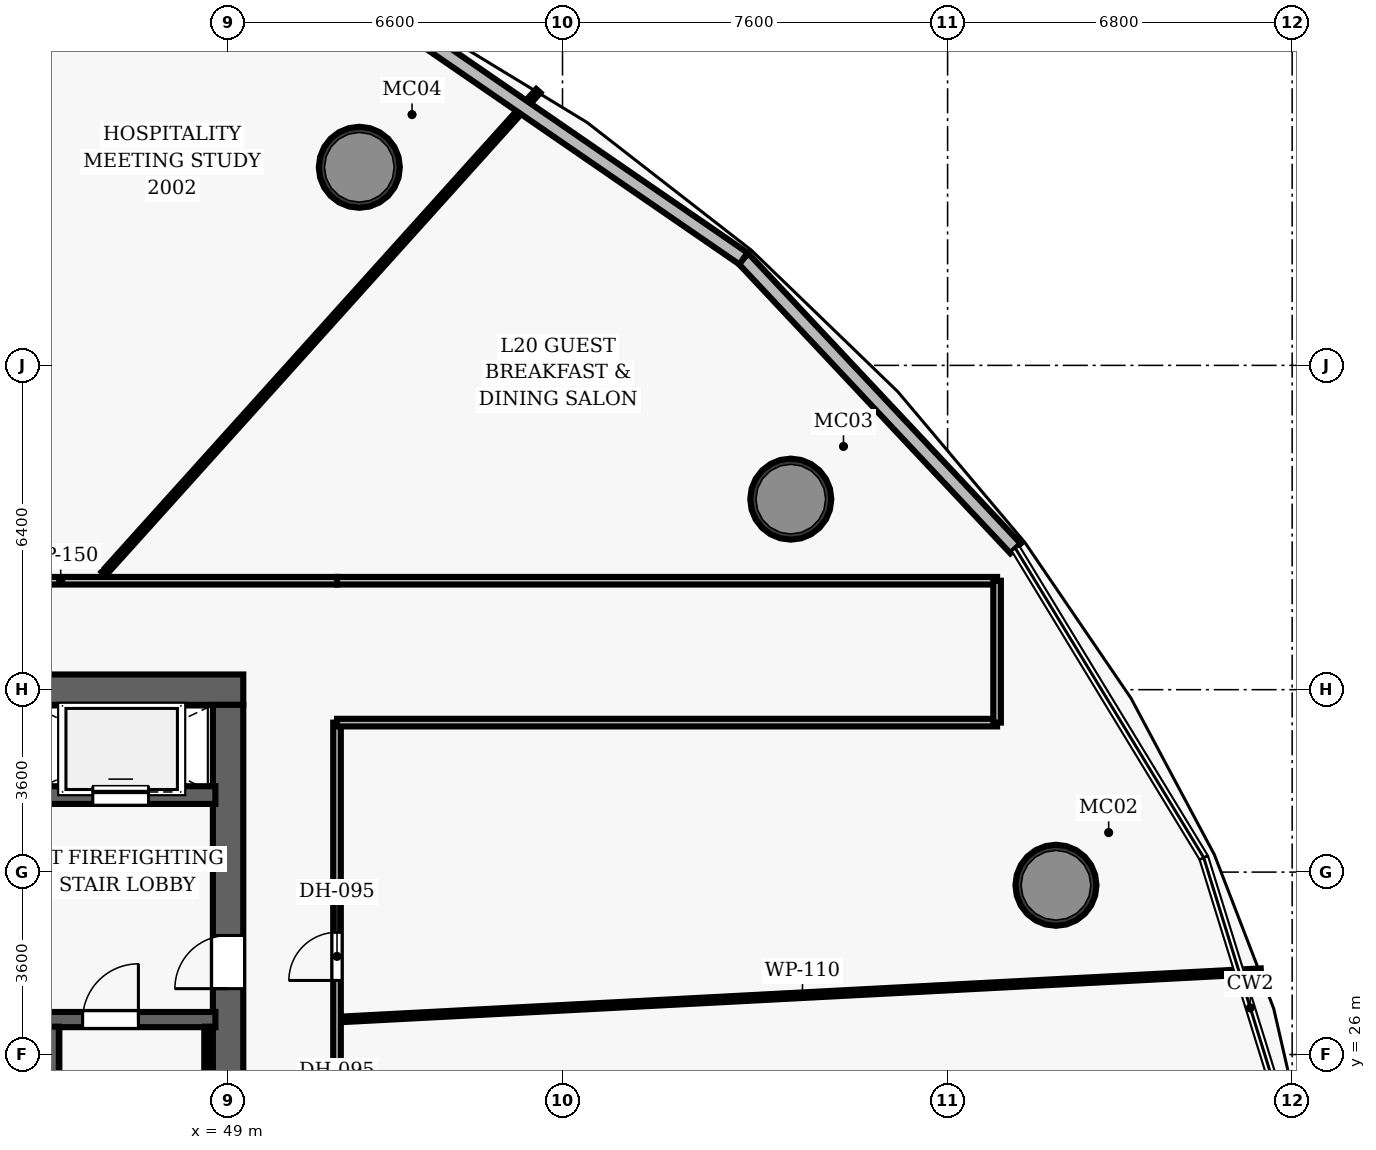
"""IFC4 building model, lengths in metres.
Left out: names, types, materials, properties, quantities, classifications, styles, units other than length and angle.
Written with IfcOpenShell. Run it as: python <this file> out.ifc"""

import sys

from ifc_helpers import new_model, si_unit, direction, frame, frame_2d, origin, origin_2d, place, context, subcontext, project, spatial, rectangle, hollow_circle, extrude, element, fill, save


model = new_model("IFC4")
c1 = context("Model", 3, precision=1e-05, world=origin(), true_north=direction((0.0, 1.0)))
c2 = subcontext(c1, "Body", "Model", "MODEL_VIEW")
j1 = project(units=[si_unit("LENGTHUNIT", "METRE"), si_unit("PLANEANGLEUNIT", "RADIAN")], contexts=[c1])
p1 = place(None, origin())
s1 = spatial("IfcSite", under=j1, at=p1, CompositionType="ELEMENT")
p2 = place(p1, origin())
s2 = spatial("IfcBuilding", under=s1, at=p2, CompositionType="ELEMENT")
p3 = place(p2, frame((0.0, 0.0, 86.9)))
s3 = spatial("IfcBuildingStorey", under=s2, at=p3, CompositionType="ELEMENT", Elevation=86.9)
p4 = place(p3, frame((26.7, 33.2, 0.0), z_axis=(0.0, 0.0, 1.0), x_axis=(1.0, 0.0, 0.0)))
e1 = element("IfcWall", 1, at=p4, inside=s3, PredefinedType="SHEAR", context=c2, shape_type="SweptSolid", body=[
    extrude(rectangle(XDim=22.6, YDim=0.6, at=frame_2d((11.3, 0.0))), origin(), (0.0, 0.0, 1.0), 3.5),
])
p5 = place(p4, frame((4.62, 0.0, 0.0)))
e2 = element("IfcOpeningElement", 2, at=p5, cuts=e1, PredefinedType="OPENING", context=c2, shape_type="SweptSolid", body=[
    extrude(rectangle(XDim=1.05, YDim=2.15, at=frame_2d((0.525, 1.075))), frame((0.0, 0.31, 0.0), z_axis=(0.0, -1.0, 0.0), x_axis=(1.0, 0.0, 0.0)), (0.0, 0.0, 1.0), 0.62),
])
p6 = place(p4, frame((14.52, 0.0, 0.0)))
e3 = element("IfcOpeningElement", 3, at=p6, cuts=e1, PredefinedType="OPENING", context=c2, shape_type="SweptSolid", body=[
    extrude(rectangle(XDim=1.05, YDim=2.15, at=frame_2d((0.525, 1.075))), frame((0.0, 0.31, 0.0), z_axis=(0.0, -1.0, 0.0), x_axis=(1.0, 0.0, 0.0)), (0.0, 0.0, 1.0), 0.62),
])
p7 = place(p3, frame((49.0, 19.1, 0.0), z_axis=(0.0, 0.0, 1.0), x_axis=(0.0, 1.0, 0.0)))
e4 = element("IfcWall", 4, at=p7, inside=s3, PredefinedType="SHEAR", context=c2, shape_type="SweptSolid", body=[
    extrude(rectangle(XDim=13.8, YDim=0.6, at=frame_2d((6.9, 0.0))), origin(), (0.0, 0.0, 1.0), 3.5),
])
p8 = place(p7, frame((8.2, 0.0, 0.0)))
e5 = element("IfcOpeningElement", 5, at=p8, cuts=e4, PredefinedType="OPENING", context=c2, shape_type="SweptSolid", body=[
    extrude(rectangle(XDim=1.05, YDim=2.15, at=frame_2d((0.525, 1.075))), frame((0.0, 0.31, 0.0), z_axis=(0.0, -1.0, 0.0), x_axis=(1.0, 0.0, 0.0)), (0.0, 0.0, 1.0), 0.62),
])
for number, where, z_axis, x_axis in (
    (6, (65.339, 29.34, 0.0), (0.0, 0.0, 1.0), (1.0, 0.0, 0.0)),
    (7, (60.105, 36.96, 0.0), (0.0, 0.0, 1.0), (1.0, 0.0, 0.0)),
    (8, (51.59, 43.509, 0.0), (0.0, 0.0, 1.0), (1.0, 0.0, 0.0)),
):
    element("IfcColumn", number, at=place(p3, frame(where, z_axis=z_axis, x_axis=x_axis)), inside=s3, PredefinedType="COLUMN", context=c2, shape_type="SweptSolid", body=[
        extrude(hollow_circle(Radius=0.8, WallThickness=0.06, at=origin_2d()), origin(), (0.0, 0.0, 1.0), 3.5),
    ])
p9 = place(p3, frame((45.08, 26.69, 0.0), z_axis=(0.0, 0.0, 1.0), x_axis=(1.0, 0.0, 0.0)))
e9 = element("IfcWall", 9, at=p9, inside=s3, PredefinedType="SHEAR", context=c2, shape_type="SweptSolid", body=[
    extrude(rectangle(XDim=3.67, YDim=0.3, at=frame_2d((1.835, 0.0))), origin(), (0.0, 0.0, 1.0), 3.5),
])
p10 = place(p9, frame((1.05, 0.0, 0.0)))
e10 = element("IfcOpeningElement", 10, at=p10, cuts=e9, PredefinedType="OPENING", context=c2, shape_type="SweptSolid", body=[
    extrude(rectangle(XDim=1.1, YDim=2.15, at=frame_2d((0.55, 1.075))), frame((0.0, 0.16, 0.0), z_axis=(0.0, -1.0, 0.0), x_axis=(1.0, 0.0, 0.0)), (0.0, 0.0, 1.0), 0.32),
])
p11 = place(p3, frame((45.51, 19.05, 0.0), z_axis=(0.0, 0.0, 1.0), x_axis=(0.0, 1.0, 0.0)))
e11 = element("IfcWall", 11, at=p11, inside=s3, PredefinedType="SHEAR", context=c2, shape_type="SweptSolid", body=[
    extrude(rectangle(XDim=7.5, YDim=0.3, at=frame_2d((3.75, 0.0))), origin(), (0.0, 0.0, 1.0), 3.5),
])
p12 = place(p3, frame((48.605, 19.1, 0.0), z_axis=(0.0, 0.0, 1.0), x_axis=(0.0, 1.0, 0.0)))
e12 = element("IfcWall", 12, at=p12, inside=s3, PredefinedType="SHEAR", context=c2, shape_type="SweptSolid", body=[
    extrude(rectangle(XDim=7.45, YDim=0.12, at=frame_2d((3.725, 0.0))), origin(), (0.0, 0.0, 1.0), 3.5),
])
p13 = place(p3, frame((45.08, 31.12, 0.0), z_axis=(0.0, 0.0, 1.0), x_axis=(1.0, 0.0, 0.0)))
e13 = element("IfcWall", 13, at=p13, inside=s3, PredefinedType="SHEAR", context=c2, shape_type="SweptSolid", body=[
    extrude(rectangle(XDim=3.67, YDim=0.35, at=frame_2d((1.835, 0.0))), origin(), (0.0, 0.0, 1.0), 2.6),
])
p14 = place(p13, frame((1.25, 0.0, 0.0)))
e14 = element("IfcOpeningElement", 14, at=p14, cuts=e13, PredefinedType="OPENING", context=c2, shape_type="SweptSolid", body=[
    extrude(rectangle(XDim=1.1, YDim=2.15, at=frame_2d((0.55, 1.075))), frame((0.0, 0.185, 0.0), z_axis=(0.0, -1.0, 0.0), x_axis=(1.0, 0.0, 0.0)), (0.0, 0.0, 1.0), 0.37),
])
p15 = place(p3, frame((27.65, 35.35, 0.0), z_axis=(0.0, 0.0, 1.0), x_axis=(1.0, 0.0, 0.0)))
e15 = element("IfcWall", 15, at=p15, inside=s3, PredefinedType="PARTITIONING", context=c2, shape_type="SweptSolid", body=[
    extrude(rectangle(XDim=23.5, YDim=0.15, at=frame_2d((11.75, 0.0))), origin(), (0.0, 0.0, 1.0), 2.6),
])
p16 = place(p15, frame((11.493, 0.0, 0.0)))
e16 = element("IfcOpeningElement", 16, at=p16, cuts=e15, PredefinedType="OPENING", context=c2, shape_type="SweptSolid", body=[
    extrude(rectangle(XDim=0.95, YDim=2.15, at=frame_2d((0.475, 1.075))), frame((0.0, 0.085, 0.0), z_axis=(0.0, -1.0, 0.0), x_axis=(1.0, 0.0, 0.0)), (0.0, 0.0, 1.0), 0.17),
])
p17 = place(p15, frame((7.137, 0.0, 0.0)))
e17 = element("IfcOpeningElement", 17, at=p17, cuts=e15, PredefinedType="OPENING", context=c2, shape_type="SweptSolid", body=[
    extrude(rectangle(XDim=0.95, YDim=2.15, at=frame_2d((0.475, 1.075))), frame((0.0, 0.085, 0.0), z_axis=(0.0, -1.0, 0.0), x_axis=(1.0, 0.0, 0.0)), (0.0, 0.0, 1.0), 0.17),
])
p18 = place(p3, frame((51.15, 16.65, 0.0), z_axis=(0.0, 0.0, 1.0), x_axis=(0.0, 1.0, 0.0)))
e18 = element("IfcWall", 18, at=p18, inside=s3, PredefinedType="PARTITIONING", context=c2, shape_type="SweptSolid", body=[
    extrude(rectangle(XDim=15.9, YDim=0.15, at=frame_2d((7.95, 0.0))), origin(), (0.0, 0.0, 1.0), 2.6),
])
p19 = place(p18, frame((10.812, 0.0, 0.0)))
e19 = element("IfcOpeningElement", 19, at=p19, cuts=e18, PredefinedType="OPENING", context=c2, shape_type="SweptSolid", body=[
    extrude(rectangle(XDim=0.95, YDim=2.15, at=frame_2d((0.475, 1.075))), frame((0.0, 0.085, 0.0), z_axis=(0.0, -1.0, 0.0), x_axis=(1.0, 0.0, 0.0)), (0.0, 0.0, 1.0), 0.17),
])
p20 = place(p18, frame((7.281, 0.0, 0.0)))
e20 = element("IfcOpeningElement", 20, at=p20, cuts=e18, PredefinedType="OPENING", context=c2, shape_type="SweptSolid", body=[
    extrude(rectangle(XDim=0.95, YDim=2.15, at=frame_2d((0.475, 1.075))), frame((0.0, 0.085, 0.0), z_axis=(0.0, -1.0, 0.0), x_axis=(1.0, 0.0, 0.0)), (0.0, 0.0, 1.0), 0.17),
])
for number, where, z_axis, x_axis in (
    (21, (51.15, 35.35, 0.0), (0.0, 0.0, 1.0), (1.0, 0.0, 0.0)),
    (22, (51.15, 32.55, 0.0), (0.0, 0.0, 1.0), (1.0, 0.0, 0.0)),
):
    element("IfcWall", number, at=place(p3, frame(where, z_axis=z_axis, x_axis=x_axis)), inside=s3, PredefinedType="PARTITIONING", context=c2, shape_type="SweptSolid", body=[
        extrude(rectangle(XDim=13.027, YDim=0.15, at=frame_2d((6.513, 0.0))), origin(), (0.0, 0.0, 1.0), 2.6),
    ])
p21 = place(p3, frame((64.177, 32.55, 0.0), z_axis=(0.0, 0.0, 1.0), x_axis=(0.0, 1.0, 0.0)))
e23 = element("IfcWall", 23, at=p21, inside=s3, PredefinedType="PARTITIONING", context=c2, shape_type="SweptSolid", body=[
    extrude(rectangle(XDim=2.8, YDim=0.15, at=frame_2d((1.4, 0.0))), origin(), (0.0, 0.0, 1.0), 2.6),
])
p22 = place(p3, frame((51.29, 26.697, 0.0), z_axis=(0.0, 0.0, 1.0), x_axis=(0.998629382131, 0.052338868396, 0.0)))
e24 = element("IfcWall", 24, at=p22, inside=s3, PredefinedType="PARTITIONING", context=c2, shape_type="SweptSolid", body=[
    extrude(rectangle(XDim=18.117, YDim=0.11, at=frame_2d((9.059, 0.0))), origin(), (0.0, 0.0, 1.0), 2.6),
])
p23 = place(p3, frame((46.545, 35.49, 0.0), z_axis=(0.0, 0.0, 1.0), x_axis=(0.669123599227, 0.743151134668, 0.0)))
e25 = element("IfcWall", 25, at=p23, inside=s3, PredefinedType="PARTITIONING", context=c2, shape_type="SweptSolid", body=[
    extrude(rectangle(XDim=12.819, YDim=0.11, at=frame_2d((6.41, 0.0))), origin(), (0.0, 0.0, 1.0), 2.6),
])
p24 = place(p3, frame((59.171, 41.708, 0.0), z_axis=(0.0, 0.0, 1.0), x_axis=(0.684312676724, -0.729188700183, 0.0)))
e26 = element("IfcWall", 26, at=p24, inside=s3, PredefinedType="SOLIDWALL", context=c2, shape_type="SweptSolid", body=[
    extrude(rectangle(XDim=7.845, YDim=0.28, at=frame_2d((3.922, 0.0))), origin(), (0.0, 0.0, 1.0), 3.25),
])
p25 = place(p3, frame((52.44, 46.339, 0.0), z_axis=(0.0, 0.0, 1.0), x_axis=(0.823866650005, -0.566783682731, 0.0)))
e27 = element("IfcWall", 27, at=p25, inside=s3, PredefinedType="SOLIDWALL", context=c2, shape_type="SweptSolid", body=[
    extrude(rectangle(XDim=8.171, YDim=0.28, at=frame_2d((4.085, 0.0))), origin(), (0.0, 0.0, 1.0), 3.25),
])
p26 = place(p10, origin())
e28 = element("IfcDoor", 28, at=p26, inside=s3, OperationType="SINGLE_SWING_RIGHT", PredefinedType="DOOR", context=c2, shape_type="SweptSolid", body=[
    extrude(rectangle(XDim=1.1, YDim=2.15, at=frame_2d((0.55, 1.075))), frame((0.0, 0.025, 0.0), z_axis=(0.0, -1.0, 0.0), x_axis=(1.0, 0.0, 0.0)), (0.0, 0.0, 1.0), 0.05),
])
fill(e10, e28)
p27 = place(p8, origin())
e29 = element("IfcDoor", 29, at=p27, inside=s3, OperationType="SINGLE_SWING_LEFT", PredefinedType="DOOR", context=c2, shape_type="SweptSolid", body=[
    extrude(rectangle(XDim=1.05, YDim=2.15, at=frame_2d((0.525, 1.075))), frame((0.0, 0.025, 0.0), z_axis=(0.0, -1.0, 0.0), x_axis=(1.0, 0.0, 0.0)), (0.0, 0.0, 1.0), 0.05),
])
fill(e5, e29)
p28 = place(p19, origin())
e30 = element("IfcDoor", 30, at=p28, inside=s3, OperationType="SINGLE_SWING_LEFT", PredefinedType="DOOR", context=c2, shape_type="SweptSolid", body=[
    extrude(rectangle(XDim=0.95, YDim=2.15, at=frame_2d((0.475, 1.075))), frame((0.0, 0.025, 0.0), z_axis=(0.0, -1.0, 0.0), x_axis=(1.0, 0.0, 0.0)), (0.0, 0.0, 1.0), 0.05),
])
fill(e19, e30)
p29 = place(p14, origin())
e31 = element("IfcDoor", 31, at=p29, inside=s3, OperationType="SLIDING_TO_LEFT", PredefinedType="DOOR", context=c2, shape_type="SweptSolid", body=[
    extrude(rectangle(XDim=1.1, YDim=2.15, at=frame_2d((0.55, 1.075))), frame((0.0, 0.025, 0.0), z_axis=(0.0, -1.0, 0.0), x_axis=(1.0, 0.0, 0.0)), (0.0, 0.0, 1.0), 0.05),
])
fill(e14, e31)
save(model, sys.argv[1])
